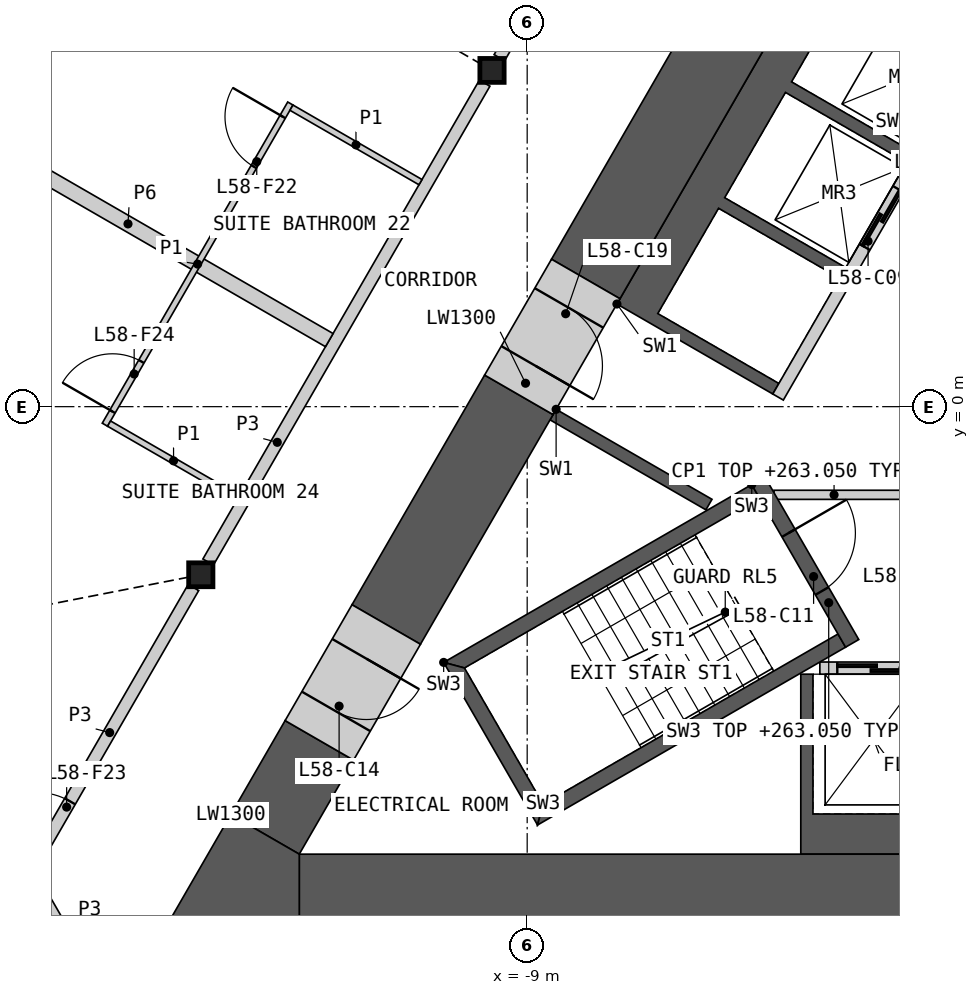
"""IFC4 building model, lengths in metres.
Left out: names, types, materials, properties, quantities, classifications, styles, units other than length and angle.
Written with IfcOpenShell. Run it as: python <this file> out.ifc"""

import sys

from ifc_helpers import new_model, si_unit, direction, frame, frame_2d, origin, origin_2d, place, context, subcontext, project, spatial, polyline, rectangle, i_section, outline, extrude, element, fill, save


model = new_model("IFC4")
c1 = context("Model", 3, precision=1e-05, world=origin(), true_north=direction((0.0, 1.0)))
c2 = subcontext(c1, "Body", "Model", "MODEL_VIEW")
j1 = project(units=[si_unit("LENGTHUNIT", "METRE"), si_unit("PLANEANGLEUNIT", "RADIAN")], contexts=[c1])
p1 = place(None, origin())
s1 = spatial("IfcSite", under=j1, at=p1, CompositionType="ELEMENT")
p2 = place(p1, origin())
s2 = spatial("IfcBuilding", under=s1, at=p2, CompositionType="ELEMENT")
p3 = place(p2, frame((0.0, 0.0, 259.8)))
s3 = spatial("IfcBuildingStorey", under=s2, at=p3, CompositionType="ELEMENT", Elevation=259.8)
for number, where, z_axis, x_axis in (
    (1, (-9.578, 5.53, 0.0), (0.0, 0.0, 1.0), (1.0, 0.0, 0.0)),
    (2, (-14.368, -2.765, 0.0), (0.0, 0.0, 1.0), (1.0, 0.0, 0.0)),
):
    element("IfcColumn", number, at=place(p3, frame(where, z_axis=z_axis, x_axis=x_axis)), inside=s3, PredefinedType="COLUMN", context=c2, shape_type="SweptSolid", body=[
        extrude(i_section(OverallWidth=0.399, OverallDepth=0.393, WebThickness=0.023, FlangeThickness=0.037, at=origin_2d()), origin(), (0.0, 0.0, 1.0), 3.6),
    ])
p4 = place(p3, origin())
e3 = element("IfcWall", 3, at=p4, inside=s3, PredefinedType="SHEAR", context=c2, shape_type="SweptSolid", body=[
    extrude(outline(polyline([(0.1, -7.36), (-4.5, -7.36), (-4.5, -4.4), (-4.3, -4.4), (-4.3, -6.7), (-2.3, -6.7), (-2.3, -4.4), (-2.1, -4.4), (-2.1, -6.7), (-0.1, -6.7), (-0.1, -4.4), (0.1, -4.4), (0.1, -7.36)])), origin(), (0.0, 0.0, 1.0), 3.25),
])
p5 = place(p3, frame((-4.187, -4.3, 0.0), z_axis=(0.0, 0.0, 1.0), x_axis=(1.0, 0.0, 0.0)))
e4 = element("IfcWall", 4, at=p5, inside=s3, PredefinedType="SOLIDWALL", context=c2, shape_type="SweptSolid", body=[
    extrude(rectangle(XDim=8.373, YDim=0.2, at=frame_2d((4.187, 0.0))), origin(), (0.0, 0.0, 1.0), 3.25),
])
p6 = place(p5, frame((0.287, 0.0, 0.0)))
e5 = element("IfcOpeningElement", 5, at=p6, cuts=e4, PredefinedType="OPENING", context=c2, shape_type="SweptSolid", body=[
    extrude(rectangle(XDim=1.2, YDim=2.1, at=frame_2d((0.6, 1.05))), frame((0.0, 0.11, 0.0), z_axis=(0.0, -1.0, 0.0), x_axis=(1.0, 0.0, 0.0)), (0.0, 0.0, 1.0), 0.22),
])
p7 = place(p5, frame((2.387, 0.0, 0.0)))
e6 = element("IfcOpeningElement", 6, at=p7, cuts=e4, PredefinedType="OPENING", context=c2, shape_type="SweptSolid", body=[
    extrude(rectangle(XDim=1.4, YDim=2.1, at=frame_2d((0.7, 1.05))), frame((0.0, 0.11, 0.0), z_axis=(0.0, -1.0, 0.0), x_axis=(1.0, 0.0, 0.0)), (0.0, 0.0, 1.0), 0.22),
])
p8 = place(p5, frame((4.837, 0.0, 0.0)))
e7 = element("IfcOpeningElement", 7, at=p8, cuts=e4, PredefinedType="OPENING", context=c2, shape_type="SweptSolid", body=[
    extrude(rectangle(XDim=0.9, YDim=2.1, at=frame_2d((0.45, 1.05))), frame((0.0, 0.11, 0.0), z_axis=(0.0, -1.0, 0.0), x_axis=(1.0, 0.0, 0.0)), (0.0, 0.0, 1.0), 0.22),
])
p9 = place(p5, frame((6.887, 0.0, 0.0)))
e8 = element("IfcOpeningElement", 8, at=p9, cuts=e4, PredefinedType="OPENING", context=c2, shape_type="SweptSolid", body=[
    extrude(rectangle(XDim=1.2, YDim=2.1, at=frame_2d((0.6, 1.05))), frame((0.0, 0.11, 0.0), z_axis=(0.0, -1.0, 0.0), x_axis=(1.0, 0.0, 0.0)), (0.0, 0.0, 1.0), 0.22),
])
p10 = place(p3, origin())
e9 = element("IfcWall", 9, at=p10, inside=s3, PredefinedType="SHEAR", context=c2, shape_type="SweptSolid", body=[
    extrude(outline(polyline([(-7.524, 1.688), (-4.124, 7.577), (-3.731, 7.35), (-1.561, 6.097), (-1.66, 5.924), (-3.652, 7.074), (-4.652, 5.342), (-2.66, 4.192), (-2.76, 4.019), (-4.752, 5.169), (-5.752, 3.437), (-3.76, 2.287), (-3.861, 2.113), (-5.852, 3.263), (-6.852, 1.531), (-4.861, 0.381), (-4.96, 0.208), (-7.131, 1.461), (-7.524, 1.688)])), origin(), (0.0, 0.0, 1.0), 3.25),
])
p11 = place(p3, origin())
e10 = element("IfcWall", 10, at=p11, inside=s3, PredefinedType="SHEAR", context=c2, shape_type="SweptSolid", body=[
    extrude(outline(polyline([(-8.524, -0.044), (-8.131, -0.271), (-5.96, -1.524), (-6.061, -1.697), (-8.231, -0.444), (-8.624, -0.217), (-8.524, -0.044)])), origin(), (0.0, 0.0, 1.0), 3.25),
])
p12 = place(p3, frame((-1.631, 5.776, 0.0), z_axis=(0.0, 0.0, 1.0), x_axis=(-0.499992876559, -0.866029516466, 0.0)))
e11 = element("IfcWall", 11, at=p12, inside=s3, PredefinedType="SOLIDWALL", context=c2, shape_type="SweptSolid", body=[
    extrude(rectangle(XDim=6.486, YDim=0.2, at=frame_2d((3.243, 0.0))), origin(), (0.0, 0.0, 1.0), 3.25),
])
p13 = place(p12, frame((0.337, 0.0, 0.0)))
e12 = element("IfcOpeningElement", 12, at=p13, cuts=e11, PredefinedType="OPENING", context=c2, shape_type="SweptSolid", body=[
    extrude(rectangle(XDim=1.1, YDim=2.1, at=frame_2d((0.55, 1.05))), frame((0.0, 0.11, 0.0), z_axis=(0.0, -1.0, 0.0), x_axis=(1.0, 0.0, 0.0)), (0.0, 0.0, 1.0), 0.22),
])
p14 = place(p12, frame((2.537, 0.0, 0.0)))
e13 = element("IfcOpeningElement", 13, at=p14, cuts=e11, PredefinedType="OPENING", context=c2, shape_type="SweptSolid", body=[
    extrude(rectangle(XDim=1.1, YDim=2.1, at=frame_2d((0.55, 1.05))), frame((0.0, 0.11, 0.0), z_axis=(0.0, -1.0, 0.0), x_axis=(1.0, 0.0, 0.0)), (0.0, 0.0, 1.0), 0.22),
])
p15 = place(p3, frame((-4.941, -1.45, 0.0), z_axis=(0.0, 0.0, 1.0), x_axis=(1.0, 0.0, 0.0)))
e14 = element("IfcWall", 14, at=p15, inside=s3, PredefinedType="PARTITIONING", context=c2, shape_type="SweptSolid", body=[
    extrude(rectangle(XDim=9.882, YDim=0.15, at=frame_2d((4.941, 0.0))), origin(), (0.0, 0.0, 1.0), 3.25),
])
p16 = place(p15, frame((4.391, 0.0, 0.0)))
e15 = element("IfcOpeningElement", 15, at=p16, cuts=e14, PredefinedType="OPENING", context=c2, shape_type="SweptSolid", body=[
    extrude(rectangle(XDim=1.1, YDim=2.1, at=frame_2d((0.55, 1.05))), frame((0.0, 0.085, 0.0), z_axis=(0.0, -1.0, 0.0), x_axis=(1.0, 0.0, 0.0)), (0.0, 0.0, 1.0), 0.17),
])
p17 = place(p3, origin())
e16 = element("IfcWall", 16, at=p17, inside=s3, PredefinedType="SHEAR", context=c2, shape_type="SweptSolid", body=[
    extrude(outline(polyline([(-5.307, -1.281), (-10.374, -4.206), (-10.032, -4.298), (-5.182, -1.498), (-5.307, -1.281)])), origin(), (0.0, 0.0, 1.0), 3.25),
])
p18 = place(p3, origin())
e17 = element("IfcWall", 17, at=p18, inside=s3, PredefinedType="SHEAR", context=c2, shape_type="SweptSolid", body=[
    extrude(outline(polyline([(-10.374, -4.206), (-8.83, -6.881), (-8.738, -6.539), (-10.032, -4.298), (-10.374, -4.206)])), origin(), (0.0, 0.0, 1.0), 3.25),
])
p19 = place(p3, origin())
e18 = element("IfcWall", 18, at=p19, inside=s3, PredefinedType="SHEAR", context=c2, shape_type="SweptSolid", body=[
    extrude(outline(polyline([(-8.738, -6.539), (-8.83, -6.881), (-3.763, -3.956), (-3.888, -3.739), (-8.738, -6.539)])), origin(), (0.0, 0.0, 1.0), 3.25),
])
p20 = place(p3, frame((-5.199, -1.219, 0.0), z_axis=(0.0, 0.0, 1.0), x_axis=(0.499982516597, -0.866035497597, 0.0)))
e19 = element("IfcWall", 19, at=p20, inside=s3, PredefinedType="SHEAR", context=c2, shape_type="SweptSolid", body=[
    extrude(rectangle(XDim=3.088, YDim=0.25, at=frame_2d((1.544, 0.0))), origin(), (0.0, 0.0, 1.0), 3.25),
])
p21 = place(p20, frame((0.994, 0.0, 0.0)))
e20 = element("IfcOpeningElement", 20, at=p21, cuts=e19, PredefinedType="OPENING", context=c2, shape_type="SweptSolid", body=[
    extrude(rectangle(XDim=1.1, YDim=2.1, at=frame_2d((0.55, 1.05))), frame((0.0, 0.135, 0.0), z_axis=(0.0, -1.0, 0.0), x_axis=(1.0, 0.0, 0.0)), (0.0, 0.0, 1.0), 0.27),
])
p22 = place(p3, frame((-12.748, -8.01, 0.0), z_axis=(0.0, 0.0, 1.0), x_axis=(1.0, 0.0, 0.0)))
e21 = element("IfcWall", 21, at=p22, inside=s3, PredefinedType="SHEAR", context=c2, shape_type="SweptSolid", body=[
    extrude(rectangle(XDim=25.497, YDim=1.3, at=frame_2d((12.748, 0.0))), origin(), (0.0, 0.0, 1.0), 3.25),
])
p23 = place(p3, frame((-4.245, 8.668, 0.0), z_axis=(0.0, 0.0, 1.0), x_axis=(-0.500002971097, -0.866023688414, 0.0)))
e22 = element("IfcWall", 22, at=p23, inside=s3, PredefinedType="SHEAR", context=c2, shape_type="SweptSolid", body=[
    extrude(rectangle(XDim=7.584, YDim=1.3, at=frame_2d((3.792, 0.0))), origin(), (0.0, 0.0, 1.0), 3.25),
])
p24 = place(p3, frame((-9.137, 0.195, 0.0), z_axis=(0.0, 0.0, 1.0), x_axis=(-0.499985697398, -0.866033661238, 0.0)))
e23 = element("IfcWall", 23, at=p24, inside=s3, PredefinedType="SHEAR", context=c2, shape_type="SweptSolid", body=[
    extrude(rectangle(XDim=4.362, YDim=1.3, at=frame_2d((2.181, 0.0))), origin(), (0.0, 0.0, 1.0), 3.25),
])
p25 = place(p3, frame((-12.418, -5.488, 0.0), z_axis=(0.0, 0.0, 1.0), x_axis=(-0.499931460552, -0.866064971437, 0.0)))
e24 = element("IfcWall", 24, at=p25, inside=s3, PredefinedType="SHEAR", context=c2, shape_type="SweptSolid", body=[
    extrude(rectangle(XDim=1.786, YDim=1.3, at=frame_2d((0.893, 0.0))), origin(), (0.0, 0.0, 1.0), 3.25),
])
p26 = place(p3, origin())
e25 = element("IfcWall", 25, at=p26, inside=s3, PredefinedType="SHEAR", context=c2, shape_type="SweptSolid", body=[
    extrude(outline(polyline([(-13.874, -6.71), (-12.748, -7.36), (-12.748, -8.66), (-15.0, -8.66), (-13.874, -6.71)])), origin(), (0.0, 0.0, 1.0), 3.25),
])
p27 = place(p3, frame((-11.318, -3.583, 0.0), z_axis=(0.0, 0.0, 1.0), x_axis=(-0.50002983664, -0.866008176907, 0.0)))
e26 = element("IfcWall", 26, at=p27, inside=s3, PredefinedType="SHEAR", context=c2, shape_type="SweptSolid", body=[
    extrude(rectangle(XDim=2.2, YDim=1.3, at=frame_2d((1.1, 0.0))), origin(), (0.0, 0.0, 1.0), 3.25),
])
p28 = place(p27, frame((0.65, 0.0, 0.0)))
e27 = element("IfcOpeningElement", 27, at=p28, cuts=e26, PredefinedType="OPENING", context=c2, shape_type="SweptSolid", body=[
    extrude(rectangle(XDim=1.0, YDim=2.1, at=frame_2d((0.5, 1.05))), frame((0.0, 0.66, 0.0), z_axis=(0.0, -1.0, 0.0), x_axis=(1.0, 0.0, 0.0)), (0.0, 0.0, 1.0), 1.32),
])
p29 = place(p3, frame((-8.037, 2.1, 0.0), z_axis=(0.0, 0.0, 1.0), x_axis=(-0.50002983664, -0.866008176907, 0.0)))
e28 = element("IfcWall", 28, at=p29, inside=s3, PredefinedType="SHEAR", context=c2, shape_type="SweptSolid", body=[
    extrude(rectangle(XDim=2.2, YDim=1.3, at=frame_2d((1.1, 0.0))), origin(), (0.0, 0.0, 1.0), 3.25),
])
p30 = place(p29, frame((0.55, 0.0, 0.0)))
e29 = element("IfcOpeningElement", 29, at=p30, cuts=e28, PredefinedType="OPENING", context=c2, shape_type="SweptSolid", body=[
    extrude(rectangle(XDim=1.1, YDim=2.1, at=frame_2d((0.55, 1.05))), frame((0.0, 0.66, 0.0), z_axis=(0.0, -1.0, 0.0), x_axis=(1.0, 0.0, 0.0)), (0.0, 0.0, 1.0), 1.32),
])
p31 = place(p3, frame((-14.247, -2.556, 0.0), z_axis=(0.0, 0.0, 1.0), x_axis=(0.49998193945, 0.866035830797, 0.0)))
e30 = element("IfcWall", 30, at=p31, inside=s3, PredefinedType="PARTITIONING", context=c2, shape_type="SweptSolid", body=[
    extrude(rectangle(XDim=9.094, YDim=0.2, at=frame_2d((4.547, 0.0))), origin(), (0.0, 0.0, 1.0), 3.25),
])
p32 = place(p3, frame((-9.458, 5.74, 0.0), z_axis=(0.0, 0.0, 1.0), x_axis=(0.50000207303, 0.866024206917, 0.0)))
e31 = element("IfcWall", 31, at=p32, inside=s3, PredefinedType="PARTITIONING", context=c2, shape_type="SweptSolid", body=[
    extrude(rectangle(XDim=9.095, YDim=0.2, at=frame_2d((4.547, 0.0))), origin(), (0.0, 0.0, 1.0), 3.25),
])
p33 = place(p32, frame((6.833, 0.0, 0.0)))
e32 = element("IfcOpeningElement", 32, at=p33, cuts=e31, PredefinedType="OPENING", context=c2, shape_type="SweptSolid", body=[
    extrude(rectangle(XDim=1.1, YDim=2.1, at=frame_2d((0.55, 1.05))), frame((0.0, 0.11, 0.0), z_axis=(0.0, -1.0, 0.0), x_axis=(1.0, 0.0, 0.0)), (0.0, 0.0, 1.0), 0.22),
])
p34 = place(p3, frame((-18.875, 4.917, 0.0), z_axis=(0.0, 0.0, 1.0), x_axis=(0.866017519557, -0.500013655634, 0.0)))
e33 = element("IfcWall", 33, at=p34, inside=s3, PredefinedType="PARTITIONING", context=c2, shape_type="SweptSolid", body=[
    extrude(rectangle(XDim=7.644, YDim=0.25, at=frame_2d((3.822, 0.0))), origin(), (0.0, 0.0, 1.0), 2.404),
])
p35 = place(p3, frame((-17.244, -7.747, 0.0), z_axis=(0.0, 0.0, 1.0), x_axis=(0.500017753321, 0.866015153657, 0.0)))
e34 = element("IfcWall", 34, at=p35, inside=s3, PredefinedType="PARTITIONING", context=c2, shape_type="SweptSolid", body=[
    extrude(rectangle(XDim=5.51, YDim=0.2, at=frame_2d((2.755, 0.0))), origin(), (0.0, 0.0, 1.0), 3.25),
])
p36 = place(p35, frame((0.35, 0.0, 0.0)))
e35 = element("IfcOpeningElement", 35, at=p36, cuts=e34, PredefinedType="OPENING", context=c2, shape_type="SweptSolid", body=[
    extrude(rectangle(XDim=1.1, YDim=2.1, at=frame_2d((0.55, 1.05))), frame((0.0, 0.11, 0.0), z_axis=(0.0, -1.0, 0.0), x_axis=(1.0, 0.0, 0.0)), (0.0, 0.0, 1.0), 0.22),
])
p37 = place(p3, frame((-17.144, -7.747, 0.0), z_axis=(0.0, 0.0, 1.0), x_axis=(0.499958791762, -0.866049194065, 0.0)))
e36 = element("IfcWall", 36, at=p37, inside=s3, PredefinedType="PARTITIONING", context=c2, shape_type="SweptSolid", body=[
    extrude(rectangle(XDim=3.726, YDim=0.2, at=frame_2d((1.863, 0.0))), origin(), (0.0, 0.0, 1.0), 3.25),
])
p38 = place(p37, frame((1.388, 0.0, 0.0)))
e37 = element("IfcOpeningElement", 37, at=p38, cuts=e36, PredefinedType="OPENING", context=c2, shape_type="SweptSolid", body=[
    extrude(rectangle(XDim=0.95, YDim=2.1, at=frame_2d((0.475, 1.05))), frame((0.0, 0.11, 0.0), z_axis=(0.0, -1.0, 0.0), x_axis=(1.0, 0.0, 0.0)), (0.0, 0.0, 1.0), 0.22),
])
p39 = place(p3, frame((-15.945, -0.297, 0.0), z_axis=(0.0, 0.0, 1.0), x_axis=(0.499978833458, 0.866037623948, 0.0)))
e38 = element("IfcWall", 38, at=p39, inside=s3, PredefinedType="PARTITIONING", context=c2, shape_type="SweptSolid", body=[
    extrude(rectangle(XDim=6.1, YDim=0.1, at=frame_2d((3.05, 0.0))), origin(), (0.0, 0.0, 1.0), 2.404),
])
p40 = place(p39, frame((4.9, 0.0, 0.0)))
e39 = element("IfcOpeningElement", 39, at=p40, cuts=e38, PredefinedType="OPENING", context=c2, shape_type="SweptSolid", body=[
    extrude(rectangle(XDim=0.95, YDim=2.1, at=frame_2d((0.475, 1.05))), frame((0.0, 0.06, 0.0), z_axis=(0.0, -1.0, 0.0), x_axis=(1.0, 0.0, 0.0)), (0.0, 0.0, 1.0), 0.12),
])
p41 = place(p39, frame((0.25, 0.0, 0.0)))
e40 = element("IfcOpeningElement", 40, at=p41, cuts=e38, PredefinedType="OPENING", context=c2, shape_type="SweptSolid", body=[
    extrude(rectangle(XDim=0.95, YDim=2.1, at=frame_2d((0.475, 1.05))), frame((0.0, 0.06, 0.0), z_axis=(0.0, -1.0, 0.0), x_axis=(1.0, 0.0, 0.0)), (0.0, 0.0, 1.0), 0.12),
])
for number, where, z_axis, x_axis in (
    (41, (-12.877, 4.917, 0.0), (0.0, 0.0, 1.0), (0.866, -0.5, 0.0)),
    (42, (-15.877, -0.279, 0.0), (0.0, 0.0, 1.0), (0.866, -0.5, 0.0)),
):
    element("IfcWall", number, at=place(p3, frame(where, z_axis=z_axis, x_axis=x_axis)), inside=s3, PredefinedType="PARTITIONING", context=c2, shape_type="SweptSolid", body=[
        extrude(rectangle(XDim=2.45, YDim=0.1, at=frame_2d((1.225, 0.0))), origin(), (0.0, 0.0, 1.0), 2.404),
    ])
p42 = place(p6, origin())
e43 = element("IfcDoor", 43, at=p42, inside=s3, OperationType="SLIDING_TO_LEFT", PredefinedType="DOOR", context=c2, shape_type="SweptSolid", body=[
    extrude(rectangle(XDim=1.2, YDim=2.1, at=frame_2d((0.6, 1.05))), frame((0.0, 0.025, 0.0), z_axis=(0.0, -1.0, 0.0), x_axis=(1.0, 0.0, 0.0)), (0.0, 0.0, 1.0), 0.05),
])
fill(e5, e43)
p43 = place(p14, origin())
e44 = element("IfcDoor", 44, at=p43, inside=s3, OperationType="SLIDING_TO_LEFT", PredefinedType="DOOR", context=c2, shape_type="SweptSolid", body=[
    extrude(rectangle(XDim=1.1, YDim=2.1, at=frame_2d((0.55, 1.05))), frame((0.0, 0.025, 0.0), z_axis=(0.0, -1.0, 0.0), x_axis=(1.0, 0.0, 0.0)), (0.0, 0.0, 1.0), 0.05),
])
fill(e13, e44)
p44 = place(p21, origin())
e45 = element("IfcDoor", 45, at=p44, inside=s3, OperationType="SINGLE_SWING_LEFT", PredefinedType="DOOR", context=c2, shape_type="SweptSolid", body=[
    extrude(rectangle(XDim=1.1, YDim=2.1, at=frame_2d((0.55, 1.05))), frame((0.0, 0.025, 0.0), z_axis=(0.0, -1.0, 0.0), x_axis=(1.0, 0.0, 0.0)), (0.0, 0.0, 1.0), 0.05),
])
fill(e20, e45)
p45 = place(p28, origin())
e46 = element("IfcDoor", 46, at=p45, inside=s3, OperationType="SINGLE_SWING_LEFT", PredefinedType="DOOR", context=c2, shape_type="SweptSolid", body=[
    extrude(rectangle(XDim=1.0, YDim=2.1, at=frame_2d((0.5, 1.05))), frame((0.0, 0.405, 0.0), z_axis=(0.0, -1.0, 0.0), x_axis=(1.0, 0.0, 0.0)), (0.0, 0.0, 1.0), 0.05),
])
fill(e27, e46)
p46 = place(p30, origin())
e47 = element("IfcDoor", 47, at=p46, inside=s3, OperationType="SINGLE_SWING_RIGHT", PredefinedType="DOOR", context=c2, shape_type="SweptSolid", body=[
    extrude(rectangle(XDim=1.1, YDim=2.1, at=frame_2d((0.55, 1.05))), frame((0.0, 0.405, 0.0), z_axis=(0.0, -1.0, 0.0), x_axis=(1.0, 0.0, 0.0)), (0.0, 0.0, 1.0), 0.05),
])
fill(e29, e47)
p47 = place(p40, origin())
e48 = element("IfcDoor", 48, at=p47, inside=s3, OperationType="SINGLE_SWING_RIGHT", PredefinedType="DOOR", context=c2, shape_type="SweptSolid", body=[
    extrude(rectangle(XDim=0.95, YDim=2.1, at=frame_2d((0.475, 1.05))), frame((0.0, 0.025, 0.0), z_axis=(0.0, -1.0, 0.0), x_axis=(1.0, 0.0, 0.0)), (0.0, 0.0, 1.0), 0.05),
])
fill(e39, e48)
p48 = place(p36, origin())
e49 = element("IfcDoor", 49, at=p48, inside=s3, OperationType="SINGLE_SWING_LEFT", PredefinedType="DOOR", context=c2, shape_type="SweptSolid", body=[
    extrude(rectangle(XDim=1.1, YDim=2.1, at=frame_2d((0.55, 1.05))), frame((0.0, 0.025, 0.0), z_axis=(0.0, -1.0, 0.0), x_axis=(1.0, 0.0, 0.0)), (0.0, 0.0, 1.0), 0.05),
])
fill(e35, e49)
p49 = place(p41, origin())
e50 = element("IfcDoor", 50, at=p49, inside=s3, OperationType="SINGLE_SWING_LEFT", PredefinedType="DOOR", context=c2, shape_type="SweptSolid", body=[
    extrude(rectangle(XDim=0.95, YDim=2.1, at=frame_2d((0.475, 1.05))), frame((0.0, 0.025, 0.0), z_axis=(0.0, -1.0, 0.0), x_axis=(1.0, 0.0, 0.0)), (0.0, 0.0, 1.0), 0.05),
])
fill(e40, e50)
save(model, sys.argv[1])
